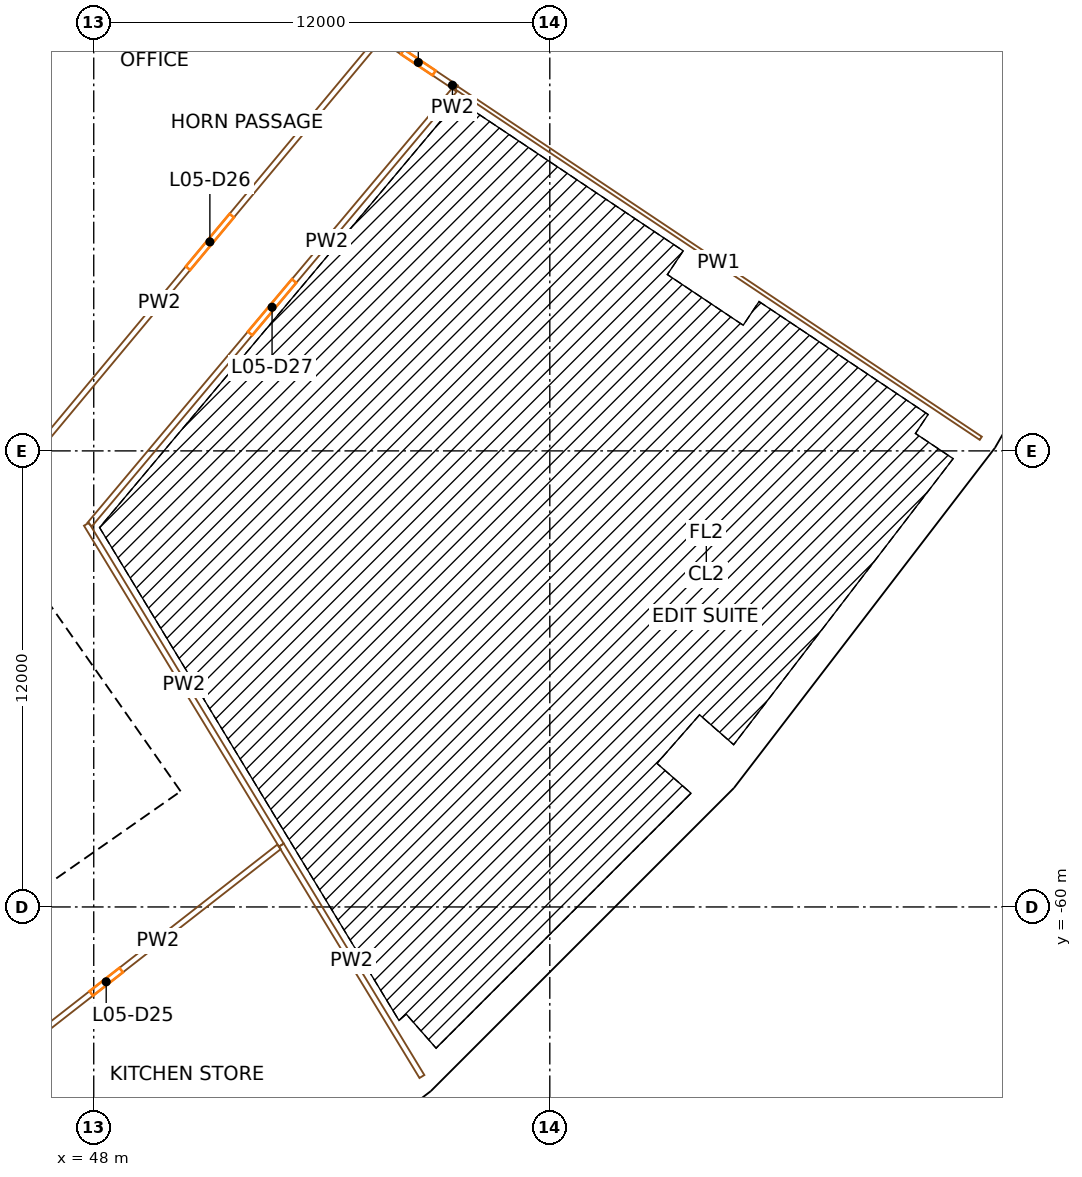
"""IFC4 building model, lengths in metres.
Left out: names, types, materials, properties, quantities, classifications, styles, units other than length and angle.
Written with IfcOpenShell. Run it as: python <this file> out.ifc"""

import sys

from ifc_helpers import new_model, si_unit, direction, frame, frame_2d, origin, origin_2d, place, context, subcontext, project, spatial, rectangle, extrude, element, fill, save


model = new_model("IFC4")
c1 = context("Model", 3, precision=1e-05, world=origin(), true_north=direction((0.0, 1.0)))
c2 = subcontext(c1, "Body", "Model", "MODEL_VIEW")
j1 = project(units=[si_unit("LENGTHUNIT", "METRE"), si_unit("PLANEANGLEUNIT", "RADIAN")], contexts=[c1])
p1 = place(None, origin())
s1 = spatial("IfcSite", under=j1, at=p1, CompositionType="ELEMENT")
p2 = place(p1, origin())
s2 = spatial("IfcBuilding", under=s1, at=p2, CompositionType="ELEMENT")
p3 = place(p2, frame((0.0, 0.0, 36.0)))
s3 = spatial("IfcBuildingStorey", under=s2, at=p3, CompositionType="ELEMENT", Elevation=36.0)
p4 = place(p3, frame((51.264, -58.456, 0.0), z_axis=(0.0, 0.0, 1.0), x_axis=(0.751839807479, 0.6593458151, 0.0)))
e1 = element("IfcColumn", 1, at=p4, inside=s3, PredefinedType="COLUMN", context=c2, shape_type="SweptSolid", body=[
    extrude(rectangle(XDim=1.4, YDim=1.8, at=origin_2d()), origin(), (0.0, 0.0, 1.0), 4.5),
])
p5 = place(p3, frame((56.209, -64.094, 0.0), z_axis=(0.0, 0.0, 1.0), x_axis=(0.751839807479, 0.6593458151, 0.0)))
e2 = element("IfcColumn", 2, at=p5, inside=s3, PredefinedType="COLUMN", context=c2, shape_type="SweptSolid", body=[
    extrude(rectangle(XDim=1.1, YDim=1.3, at=origin_2d()), origin(), (0.0, 0.0, 1.0), 4.5),
])
p6 = place(p3, frame((58.456, -51.264, 0.0), z_axis=(0.0, 0.0, 1.0), x_axis=(0.6593458151, 0.751839807479, 0.0)))
e3 = element("IfcColumn", 3, at=p6, inside=s3, PredefinedType="COLUMN", context=c2, shape_type="SweptSolid", body=[
    extrude(rectangle(XDim=1.4, YDim=1.8, at=origin_2d()), origin(), (0.0, 0.0, 1.0), 4.5),
])
p7 = place(p3, frame((64.094, -56.209, 0.0), z_axis=(0.0, 0.0, 1.0), x_axis=(0.6593458151, 0.751839807479, 0.0)))
e4 = element("IfcColumn", 4, at=p7, inside=s3, PredefinedType="COLUMN", context=c2, shape_type="SweptSolid", body=[
    extrude(rectangle(XDim=1.1, YDim=1.3, at=origin_2d()), origin(), (0.0, 0.0, 1.0), 4.5),
])
p8 = place(p3, frame((64.647, -43.196, 0.0), z_axis=(0.0, 0.0, 1.0), x_axis=(0.55557023302, 0.831469612303, 0.0)))
e5 = element("IfcColumn", 5, at=p8, inside=s3, PredefinedType="COLUMN", context=c2, shape_type="SweptSolid", body=[
    extrude(rectangle(XDim=1.4, YDim=1.8, at=origin_2d()), origin(), (0.0, 0.0, 1.0), 4.5),
])
p9 = place(p3, frame((70.883, -47.362, 0.0), z_axis=(0.0, 0.0, 1.0), x_axis=(0.55557023302, 0.831469612303, 0.0)))
e6 = element("IfcColumn", 6, at=p9, inside=s3, PredefinedType="COLUMN", context=c2, shape_type="SweptSolid", body=[
    extrude(rectangle(XDim=1.1, YDim=1.3, at=origin_2d()), origin(), (0.0, 0.0, 1.0), 4.5),
])
p10 = place(p3, frame((49.779, -57.191, 0.0), z_axis=(0.0, 0.0, 1.0), x_axis=(-0.573577477574, 0.819151315216, 0.0)))
e7 = element("IfcWall", 7, at=p10, inside=s3, PredefinedType="SHEAR", context=c2, shape_type="SweptSolid", body=[
    extrude(rectangle(XDim=14.8, YDim=0.9, at=frame_2d((7.4, 0.0))), origin(), (0.0, 0.0, 1.0), 4.2),
])
p11 = place(p10, frame((6.7, 0.0, 0.0)))
e8 = element("IfcOpeningElement", 8, at=p11, cuts=e7, PredefinedType="OPENING", context=c2, shape_type="SweptSolid", body=[
    extrude(rectangle(XDim=1.4, YDim=2.1, at=frame_2d((0.7, 1.05))), frame((0.0, 0.46, 0.0), z_axis=(0.0, -1.0, 0.0), x_axis=(1.0, 0.0, 0.0)), (0.0, 0.0, 1.0), 0.92),
])
p12 = place(p3, frame((36.827, -65.71, 0.0), z_axis=(0.0, 0.0, 1.0), x_axis=(0.819153391756, 0.573574511963, 0.0)))
e9 = element("IfcWall", 9, at=p12, inside=s3, PredefinedType="SHEAR", context=c2, shape_type="SweptSolid", body=[
    extrude(rectangle(XDim=15.045, YDim=0.9, at=frame_2d((7.523, 0.0))), origin(), (0.0, 0.0, 1.0), 4.2),
])
p13 = place(p12, frame((0.6, 0.0, 0.0)))
e10 = element("IfcOpeningElement", 10, at=p13, cuts=e9, PredefinedType="OPENING", context=c2, shape_type="SweptSolid", body=[
    extrude(rectangle(XDim=1.0, YDim=2.1, at=frame_2d((0.5, 1.05))), frame((0.0, 0.46, 0.0), z_axis=(0.0, -1.0, 0.0), x_axis=(1.0, 0.0, 0.0)), (0.0, 0.0, 1.0), 0.92),
])
p14 = place(p12, frame((3.275, 0.0, 0.0)))
e11 = element("IfcOpeningElement", 11, at=p14, cuts=e9, PredefinedType="OPENING", context=c2, shape_type="SweptSolid", body=[
    extrude(rectangle(XDim=1.0, YDim=2.1, at=frame_2d((0.5, 1.05))), frame((0.0, 0.46, 0.0), z_axis=(0.0, -1.0, 0.0), x_axis=(1.0, 0.0, 0.0)), (0.0, 0.0, 1.0), 0.92),
])
p15 = place(p12, frame((6.175, 0.0, 0.0)))
e12 = element("IfcOpeningElement", 12, at=p15, cuts=e9, PredefinedType="OPENING", context=c2, shape_type="SweptSolid", body=[
    extrude(rectangle(XDim=1.0, YDim=2.1, at=frame_2d((0.5, 1.05))), frame((0.0, 0.46, 0.0), z_axis=(0.0, -1.0, 0.0), x_axis=(1.0, 0.0, 0.0)), (0.0, 0.0, 1.0), 0.92),
])
p16 = place(p12, frame((13.495, 0.0, 0.0)))
e13 = element("IfcOpeningElement", 13, at=p16, cuts=e9, PredefinedType="OPENING", context=c2, shape_type="SweptSolid", body=[
    extrude(rectangle(XDim=1.1, YDim=2.1, at=frame_2d((0.55, 1.05))), frame((0.0, 0.46, 0.0), z_axis=(0.0, -1.0, 0.0), x_axis=(1.0, 0.0, 0.0)), (0.0, 0.0, 1.0), 0.92),
])
p17 = place(p3, frame((41.262, -57.661, 0.0), z_axis=(0.0, 0.0, 1.0), x_axis=(0.819164398642, 0.573558792102, 0.0)))
e14 = element("IfcWall", 14, at=p17, inside=s3, PredefinedType="SOLIDWALL", context=c2, shape_type="SweptSolid", body=[
    extrude(rectangle(XDim=6.795, YDim=0.3, at=frame_2d((3.397, 0.0))), origin(), (0.0, 0.0, 1.0), 4.2),
])
p18 = place(p17, frame((5.32, 0.0, 0.0)))
e15 = element("IfcOpeningElement", 15, at=p18, cuts=e14, PredefinedType="OPENING", context=c2, shape_type="SweptSolid", body=[
    extrude(rectangle(XDim=1.1, YDim=2.1, at=frame_2d((0.55, 1.05))), frame((0.0, 0.16, 0.0), z_axis=(0.0, -1.0, 0.0), x_axis=(1.0, 0.0, 0.0)), (0.0, 0.0, 1.0), 0.32),
])
p19 = place(p3, frame((47.839, -71.491, 0.0), z_axis=(0.0, 0.0, 1.0), x_axis=(0.793355377778, 0.608758773695, 0.0)))
e16 = element("IfcWall", 16, at=p19, inside=s3, PredefinedType="SOLIDWALL", context=c2, shape_type="SweptSolid", body=[
    extrude(rectangle(XDim=11.135, YDim=0.45, at=frame_2d((5.567, 0.0))), origin(), (0.0, 0.0, 1.0), 3.2),
])
p20 = place(p19, frame((3.917, 0.0, 0.9)))
e17 = element("IfcOpeningElement", 17, at=p20, cuts=e16, PredefinedType="OPENING", context=c2, shape_type="SweptSolid", body=[
    extrude(rectangle(XDim=1.2, YDim=2.15, at=frame_2d((0.6, 1.075))), frame((0.0, 0.235, 0.0), z_axis=(0.0, -1.0, 0.0), x_axis=(1.0, 0.0, 0.0)), (0.0, 0.0, 1.0), 0.47),
])
p21 = place(p19, frame((6.017, 0.0, 0.9)))
e18 = element("IfcOpeningElement", 18, at=p21, cuts=e16, PredefinedType="OPENING", context=c2, shape_type="SweptSolid", body=[
    extrude(rectangle(XDim=1.2, YDim=2.15, at=frame_2d((0.6, 1.075))), frame((0.0, 0.235, 0.0), z_axis=(0.0, -1.0, 0.0), x_axis=(1.0, 0.0, 0.0)), (0.0, 0.0, 1.0), 0.47),
])
p22 = place(p3, frame((56.699, -64.698, 0.0), z_axis=(0.0, 0.0, 1.0), x_axis=(0.707106781187, 0.707106781187, 0.0)))
e19 = element("IfcWall", 19, at=p22, inside=s3, PredefinedType="SOLIDWALL", context=c2, shape_type="SweptSolid", body=[
    extrude(rectangle(XDim=11.312, YDim=0.45, at=frame_2d((5.656, 0.0))), origin(), (0.0, 0.0, 1.0), 3.2),
])
p23 = place(p22, frame((4.006, 0.0, 0.9)))
e20 = element("IfcOpeningElement", 20, at=p23, cuts=e19, PredefinedType="OPENING", context=c2, shape_type="SweptSolid", body=[
    extrude(rectangle(XDim=1.2, YDim=2.15, at=frame_2d((0.6, 1.075))), frame((0.0, 0.235, 0.0), z_axis=(0.0, -1.0, 0.0), x_axis=(1.0, 0.0, 0.0)), (0.0, 0.0, 1.0), 0.47),
])
p24 = place(p22, frame((6.106, 0.0, 0.9)))
e21 = element("IfcOpeningElement", 21, at=p24, cuts=e19, PredefinedType="OPENING", context=c2, shape_type="SweptSolid", body=[
    extrude(rectangle(XDim=1.2, YDim=2.15, at=frame_2d((0.6, 1.075))), frame((0.0, 0.235, 0.0), z_axis=(0.0, -1.0, 0.0), x_axis=(1.0, 0.0, 0.0)), (0.0, 0.0, 1.0), 0.47),
])
p25 = place(p3, frame((64.713, -56.673, 0.0), z_axis=(0.0, 0.0, 1.0), x_axis=(0.608758773695, 0.793355377778, 0.0)))
e22 = element("IfcWall", 22, at=p25, inside=s3, PredefinedType="SOLIDWALL", context=c2, shape_type="SweptSolid", body=[
    extrude(rectangle(XDim=11.135, YDim=0.45, at=frame_2d((5.567, 0.0))), origin(), (0.0, 0.0, 1.0), 3.2),
])
p26 = place(p25, frame((3.917, 0.0, 0.9)))
e23 = element("IfcOpeningElement", 23, at=p26, cuts=e22, PredefinedType="OPENING", context=c2, shape_type="SweptSolid", body=[
    extrude(rectangle(XDim=1.2, YDim=2.15, at=frame_2d((0.6, 1.075))), frame((0.0, 0.235, 0.0), z_axis=(0.0, -1.0, 0.0), x_axis=(1.0, 0.0, 0.0)), (0.0, 0.0, 1.0), 0.47),
])
p27 = place(p25, frame((6.017, 0.0, 0.9)))
e24 = element("IfcOpeningElement", 24, at=p27, cuts=e22, PredefinedType="OPENING", context=c2, shape_type="SweptSolid", body=[
    extrude(rectangle(XDim=1.2, YDim=2.15, at=frame_2d((0.6, 1.075))), frame((0.0, 0.235, 0.0), z_axis=(0.0, -1.0, 0.0), x_axis=(1.0, 0.0, 0.0)), (0.0, 0.0, 1.0), 0.47),
])
p28 = place(p3, frame((71.512, -47.819, 0.0), z_axis=(0.0, 0.0, 1.0), x_axis=(0.500001430823, 0.866024577697, 0.0)))
e25 = element("IfcWall", 25, at=p28, inside=s3, PredefinedType="SOLIDWALL", context=c2, shape_type="SweptSolid", body=[
    extrude(rectangle(XDim=11.312, YDim=0.45, at=frame_2d((5.656, 0.0))), origin(), (0.0, 0.0, 1.0), 3.2),
])
p29 = place(p28, frame((4.006, 0.0, 0.9)))
e26 = element("IfcOpeningElement", 26, at=p29, cuts=e25, PredefinedType="OPENING", context=c2, shape_type="SweptSolid", body=[
    extrude(rectangle(XDim=1.2, YDim=2.15, at=frame_2d((0.6, 1.075))), frame((0.0, 0.235, 0.0), z_axis=(0.0, -1.0, 0.0), x_axis=(1.0, 0.0, 0.0)), (0.0, 0.0, 1.0), 0.47),
])
p30 = place(p28, frame((6.106, 0.0, 0.9)))
e27 = element("IfcOpeningElement", 27, at=p30, cuts=e25, PredefinedType="OPENING", context=c2, shape_type="SweptSolid", body=[
    extrude(rectangle(XDim=1.2, YDim=2.15, at=frame_2d((0.6, 1.075))), frame((0.0, 0.235, 0.0), z_axis=(0.0, -1.0, 0.0), x_axis=(1.0, 0.0, 0.0)), (0.0, 0.0, 1.0), 0.47),
])
p31 = place(p3, frame((52.877, -58.418, 0.0), z_axis=(0.0, 0.0, 1.0), x_axis=(-0.788255221118, -0.615348443063, 0.0)))
e28 = element("IfcWall", 28, at=p31, inside=s3, PredefinedType="PARTITIONING", context=c2, shape_type="SweptSolid", body=[
    extrude(rectangle(XDim=11.542, YDim=0.15, at=frame_2d((5.771, 0.0))), origin(), (0.0, 0.0, 1.0), 3.1),
])
p32 = place(p31, frame((5.271, 0.0, 0.0)))
e29 = element("IfcOpeningElement", 29, at=p32, cuts=e28, PredefinedType="OPENING", context=c2, shape_type="SweptSolid", body=[
    extrude(rectangle(XDim=1.0, YDim=2.1, at=frame_2d((0.5, 1.05))), frame((0.0, 0.085, 0.0), z_axis=(0.0, -1.0, 0.0), x_axis=(1.0, 0.0, 0.0)), (0.0, 0.0, 1.0), 0.17),
])
p33 = place(p3, frame((46.617, -47.833, 0.0), z_axis=(0.0, 0.0, 1.0), x_axis=(0.639786242962, 0.768552902093, 0.0)))
e30 = element("IfcWall", 30, at=p33, inside=s3, PredefinedType="PARTITIONING", context=c2, shape_type="SweptSolid", body=[
    extrude(rectangle(XDim=13.875, YDim=0.15, at=frame_2d((6.938, 0.0))), origin(), (0.0, 0.0, 1.0), 3.1),
])
p34 = place(p33, frame((6.037, 0.0, 0.0)))
e31 = element("IfcOpeningElement", 31, at=p34, cuts=e30, PredefinedType="OPENING", context=c2, shape_type="SweptSolid", body=[
    extrude(rectangle(XDim=1.8, YDim=2.1, at=frame_2d((0.9, 1.05))), frame((0.0, 0.085, 0.0), z_axis=(0.0, -1.0, 0.0), x_axis=(1.0, 0.0, 0.0)), (0.0, 0.0, 1.0), 0.17),
])
p35 = place(p3, frame((47.808, -49.929, 0.0), z_axis=(0.0, 0.0, 1.0), x_axis=(0.519169679695, -0.854671190392, 0.0)))
e32 = element("IfcWall", 32, at=p35, inside=s3, PredefinedType="PARTITIONING", context=c2, shape_type="SweptSolid", body=[
    extrude(rectangle(XDim=9.878, YDim=0.15, at=frame_2d((4.939, 0.0))), origin(), (0.0, 0.0, 1.0), 3.1),
])
p36 = place(p3, frame((57.49, -38.503, 0.0), z_axis=(0.0, 0.0, 1.0), x_axis=(-0.642835259292, -0.766004457828, 0.0)))
e33 = element("IfcWall", 33, at=p36, inside=s3, PredefinedType="PARTITIONING", context=c2, shape_type="SweptSolid", body=[
    extrude(rectangle(XDim=14.926, YDim=0.15, at=frame_2d((7.463, 0.0))), origin(), (0.0, 0.0, 1.0), 3.1),
])
p37 = place(p36, frame((6.563, 0.0, 0.0)))
e34 = element("IfcOpeningElement", 34, at=p37, cuts=e33, PredefinedType="OPENING", context=c2, shape_type="SweptSolid", body=[
    extrude(rectangle(XDim=1.8, YDim=2.1, at=frame_2d((0.9, 1.05))), frame((0.0, 0.085, 0.0), z_axis=(0.0, -1.0, 0.0), x_axis=(1.0, 0.0, 0.0)), (0.0, 0.0, 1.0), 0.17),
])
p38 = place(p3, frame((52.936, -58.372, 0.0), z_axis=(0.0, 0.0, 1.0), x_axis=(0.519148894699, -0.854683815883, 0.0)))
e35 = element("IfcWall", 35, at=p38, inside=s3, PredefinedType="PARTITIONING", context=c2, shape_type="SweptSolid", body=[
    extrude(rectangle(XDim=7.125, YDim=0.15, at=frame_2d((3.563, 0.0))), origin(), (0.0, 0.0, 1.0), 3.1),
])
p39 = place(p3, frame((55.542, -37.112, 0.0), z_axis=(0.0, 0.0, 1.0), x_axis=(0.831423745392, -0.555638871569, 0.0)))
e36 = element("IfcWall", 36, at=p39, inside=s3, PredefinedType="PARTITIONING", context=c2, shape_type="SweptSolid", body=[
    extrude(rectangle(XDim=2.4, YDim=0.15, at=frame_2d((1.2, 0.0))), origin(), (0.0, 0.0, 1.0), 3.1),
])
p40 = place(p39, frame((0.7, 0.0, 0.0)))
e37 = element("IfcOpeningElement", 37, at=p40, cuts=e36, PredefinedType="OPENING", context=c2, shape_type="SweptSolid", body=[
    extrude(rectangle(XDim=1.0, YDim=2.1, at=frame_2d((0.5, 1.05))), frame((0.0, 0.085, 0.0), z_axis=(0.0, -1.0, 0.0), x_axis=(1.0, 0.0, 0.0)), (0.0, 0.0, 1.0), 0.17),
])
p41 = place(p3, frame((71.34, -47.668, 0.0), z_axis=(0.0, 0.0, 1.0), x_axis=(-0.831472868546, 0.555565359677, 0.0)))
e38 = element("IfcWall", 38, at=p41, inside=s3, PredefinedType="PARTITIONING", context=c2, shape_type="SweptSolid", body=[
    extrude(rectangle(XDim=16.6, YDim=0.1, at=frame_2d((8.3, 0.0))), origin(), (0.0, 0.0, 1.0), 3.1),
])
p42 = place(p16, origin())
e39 = element("IfcDoor", 39, at=p42, inside=s3, OperationType="SINGLE_SWING_LEFT", PredefinedType="DOOR", context=c2, shape_type="SweptSolid", body=[
    extrude(rectangle(XDim=1.1, YDim=2.1, at=frame_2d((0.55, 1.05))), frame((0.0, 0.025, 0.0), z_axis=(0.0, -1.0, 0.0), x_axis=(1.0, 0.0, 0.0)), (0.0, 0.0, 1.0), 0.05),
])
fill(e13, e39)
p43 = place(p23, origin())
e40 = element("IfcWindow", 40, at=p43, inside=s3, PartitioningType="SINGLE_PANEL", PredefinedType="WINDOW", context=c2, shape_type="SweptSolid", body=[
    extrude(rectangle(XDim=1.2, YDim=2.15, at=frame_2d((0.6, 1.075))), frame((0.0, 0.03, 0.0), z_axis=(0.0, -1.0, 0.0), x_axis=(1.0, 0.0, 0.0)), (0.0, 0.0, 1.0), 0.06),
])
fill(e20, e40)
p44 = place(p24, origin())
e41 = element("IfcWindow", 41, at=p44, inside=s3, PartitioningType="SINGLE_PANEL", PredefinedType="WINDOW", context=c2, shape_type="SweptSolid", body=[
    extrude(rectangle(XDim=1.2, YDim=2.15, at=frame_2d((0.6, 1.075))), frame((0.0, 0.03, 0.0), z_axis=(0.0, -1.0, 0.0), x_axis=(1.0, 0.0, 0.0)), (0.0, 0.0, 1.0), 0.06),
])
fill(e21, e41)
p45 = place(p26, origin())
e42 = element("IfcWindow", 42, at=p45, inside=s3, PartitioningType="SINGLE_PANEL", PredefinedType="WINDOW", context=c2, shape_type="SweptSolid", body=[
    extrude(rectangle(XDim=1.2, YDim=2.15, at=frame_2d((0.6, 1.075))), frame((0.0, 0.03, 0.0), z_axis=(0.0, -1.0, 0.0), x_axis=(1.0, 0.0, 0.0)), (0.0, 0.0, 1.0), 0.06),
])
fill(e23, e42)
p46 = place(p27, origin())
e43 = element("IfcWindow", 43, at=p46, inside=s3, PartitioningType="SINGLE_PANEL", PredefinedType="WINDOW", context=c2, shape_type="SweptSolid", body=[
    extrude(rectangle(XDim=1.2, YDim=2.15, at=frame_2d((0.6, 1.075))), frame((0.0, 0.03, 0.0), z_axis=(0.0, -1.0, 0.0), x_axis=(1.0, 0.0, 0.0)), (0.0, 0.0, 1.0), 0.06),
])
fill(e24, e43)
p47 = place(p32, origin())
e44 = element("IfcDoor", 44, at=p47, inside=s3, OperationType="SINGLE_SWING_RIGHT", PredefinedType="DOOR", context=c2, shape_type="SweptSolid", body=[
    extrude(rectangle(XDim=1.0, YDim=2.1, at=frame_2d((0.5, 1.05))), frame((0.0, 0.025, 0.0), z_axis=(0.0, -1.0, 0.0), x_axis=(1.0, 0.0, 0.0)), (0.0, 0.0, 1.0), 0.05),
])
fill(e29, e44)
p48 = place(p34, origin())
e45 = element("IfcDoor", 45, at=p48, inside=s3, OperationType="DOUBLE_DOOR_SINGLE_SWING", PredefinedType="DOOR", context=c2, shape_type="SweptSolid", body=[
    extrude(rectangle(XDim=1.8, YDim=2.1, at=frame_2d((0.9, 1.05))), frame((0.0, 0.025, 0.0), z_axis=(0.0, -1.0, 0.0), x_axis=(1.0, 0.0, 0.0)), (0.0, 0.0, 1.0), 0.05),
])
fill(e31, e45)
p49 = place(p37, origin())
e46 = element("IfcDoor", 46, at=p49, inside=s3, OperationType="DOUBLE_DOOR_SINGLE_SWING", PredefinedType="DOOR", context=c2, shape_type="SweptSolid", body=[
    extrude(rectangle(XDim=1.8, YDim=2.1, at=frame_2d((0.9, 1.05))), frame((0.0, 0.025, 0.0), z_axis=(0.0, -1.0, 0.0), x_axis=(1.0, 0.0, 0.0)), (0.0, 0.0, 1.0), 0.05),
])
fill(e34, e46)
p50 = place(p40, origin())
e47 = element("IfcDoor", 47, at=p50, inside=s3, OperationType="SINGLE_SWING_RIGHT", PredefinedType="DOOR", context=c2, shape_type="SweptSolid", body=[
    extrude(rectangle(XDim=1.0, YDim=2.1, at=frame_2d((0.5, 1.05))), frame((0.0, 0.025, 0.0), z_axis=(0.0, -1.0, 0.0), x_axis=(1.0, 0.0, 0.0)), (0.0, 0.0, 1.0), 0.05),
])
fill(e37, e47)
save(model, sys.argv[1])
